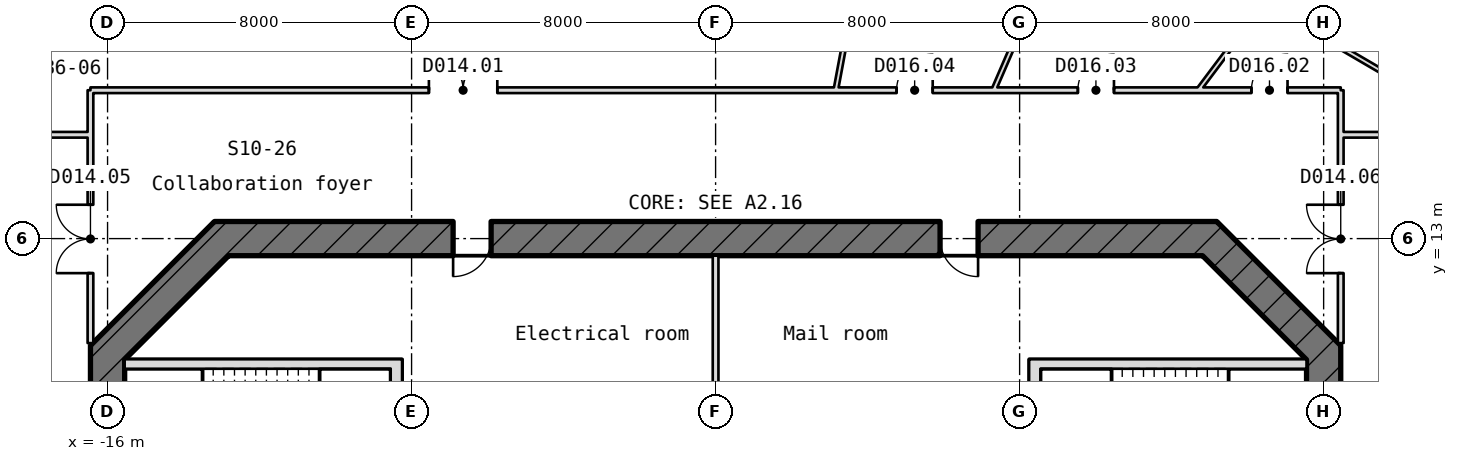
"""IFC4 building model, lengths in metres.
Left out: names, types, materials, properties, quantities, classifications, styles, units other than length and angle.
Written with IfcOpenShell. Run it as: python <this file> out.ifc"""

import sys

from ifc_helpers import new_model, si_unit, direction, frame, frame_2d, origin, place, context, subcontext, project, spatial, rectangle, extrude, element, fill, save


model = new_model("IFC4")
c1 = context("Model", 3, precision=1e-05, world=origin(), true_north=direction((0.0, 1.0)))
c2 = subcontext(c1, "Body", "Model", "MODEL_VIEW")
j1 = project(units=[si_unit("LENGTHUNIT", "METRE"), si_unit("PLANEANGLEUNIT", "RADIAN")], contexts=[c1])
p1 = place(None, origin())
s1 = spatial("IfcSite", under=j1, at=p1, CompositionType="ELEMENT")
p2 = place(p1, origin())
s2 = spatial("IfcBuilding", under=s1, at=p2, CompositionType="ELEMENT")
p3 = place(p2, frame((0.0, 0.0, 161.05)))
s3 = spatial("IfcBuildingStorey", under=s2, at=p3, CompositionType="ELEMENT", Elevation=161.05)
p4 = place(p3, frame((-16.478, 22.342, 0.0), z_axis=(0.0, 0.0, 1.0), x_axis=(-0.766197107622, -0.642605627327, 0.0)))
e1 = element("IfcWall", 1, at=p4, inside=s3, PredefinedType="SOLIDWALL", context=c2, shape_type="SweptSolid", body=[
    extrude(rectangle(XDim=11.846, YDim=0.3, at=frame_2d((5.923, 0.0))), origin(), (0.0, 0.0, 1.0), 3.97),
])
p5 = place(p4, frame((8.146, 0.0, 0.0)))
e2 = element("IfcOpeningElement", 2, at=p5, cuts=e1, PredefinedType="OPENING", context=c2, shape_type="SweptSolid", body=[
    extrude(rectangle(XDim=1.8, YDim=2.4, at=frame_2d((0.9, 1.2))), frame((0.0, 0.16, 0.0), z_axis=(0.0, -1.0, 0.0), x_axis=(1.0, 0.0, 0.0)), (0.0, 0.0, 1.0), 0.32),
])
p6 = place(p4, frame((5.546, 0.0, 0.9)))
e3 = element("IfcOpeningElement", 3, at=p6, cuts=e1, PredefinedType="OPENING", context=c2, shape_type="SweptSolid", body=[
    extrude(rectangle(XDim=2.0, YDim=1.5, at=frame_2d((1.0, 0.75))), frame((0.0, 0.16, 0.0), z_axis=(0.0, -1.0, 0.0), x_axis=(1.0, 0.0, 0.0)), (0.0, 0.0, 1.0), 0.32),
])
p7 = place(p3, frame((16.0, -10.186, -0.18), z_axis=(0.0, 0.0, 1.0), x_axis=(0.0, 1.0, 0.0)))
e4 = element("IfcWall", 4, at=p7, inside=s3, PredefinedType="SHEAR", context=c2, shape_type="SweptSolid", body=[
    extrude(rectangle(XDim=20.373, YDim=0.9, at=frame_2d((10.186, 0.0))), origin(), (0.0, 0.0, 1.0), 4.15),
])
p8 = place(p7, frame((8.986, 0.0, 0.18)))
e5 = element("IfcOpeningElement", 5, at=p8, cuts=e4, PredefinedType="OPENING", context=c2, shape_type="SweptSolid", body=[
    extrude(rectangle(XDim=2.4, YDim=2.1, at=frame_2d((1.2, 1.05))), frame((0.0, 0.46, 0.0), z_axis=(0.0, -1.0, 0.0), x_axis=(1.0, 0.0, 0.0)), (0.0, 0.0, 1.0), 0.92),
])
p9 = place(p7, frame((13.586, 0.0, 0.18)))
e6 = element("IfcOpeningElement", 6, at=p9, cuts=e4, PredefinedType="OPENING", context=c2, shape_type="SweptSolid", body=[
    extrude(rectangle(XDim=1.2, YDim=2.1, at=frame_2d((0.6, 1.05))), frame((0.0, 0.46, 0.0), z_axis=(0.0, -1.0, 0.0), x_axis=(1.0, 0.0, 0.0)), (0.0, 0.0, 1.0), 0.92),
])
p10 = place(p3, frame((16.132, 9.868, -0.18), z_axis=(0.0, 0.0, 1.0), x_axis=(-0.707106781187, 0.707106781187, 0.0)))
e7 = element("IfcWall", 7, at=p10, inside=s3, PredefinedType="SHEAR", context=c2, shape_type="SweptSolid", body=[
    extrude(rectangle(XDim=4.615, YDim=0.9, at=frame_2d((2.308, 0.0))), origin(), (0.0, 0.0, 1.0), 4.15),
])
p11 = place(p3, frame((13.186, 13.0, -0.18), z_axis=(0.0, 0.0, 1.0), x_axis=(-1.0, 0.0, 0.0)))
e8 = element("IfcWall", 8, at=p11, inside=s3, PredefinedType="SHEAR", context=c2, shape_type="SweptSolid", body=[
    extrude(rectangle(XDim=26.373, YDim=0.9, at=frame_2d((13.186, 0.0))), origin(), (0.0, 0.0, 1.0), 4.15),
])
p12 = place(p11, frame((19.094, 0.0, 0.18)))
e9 = element("IfcOpeningElement", 9, at=p12, cuts=e8, PredefinedType="OPENING", context=c2, shape_type="SweptSolid", body=[
    extrude(rectangle(XDim=1.0, YDim=2.1, at=frame_2d((0.5, 1.05))), frame((0.0, 0.46, 0.0), z_axis=(0.0, -1.0, 0.0), x_axis=(1.0, 0.0, 0.0)), (0.0, 0.0, 1.0), 0.92),
])
p13 = place(p11, frame((6.279, 0.0, 0.18)))
e10 = element("IfcOpeningElement", 10, at=p13, cuts=e8, PredefinedType="OPENING", context=c2, shape_type="SweptSolid", body=[
    extrude(rectangle(XDim=1.0, YDim=2.1, at=frame_2d((0.5, 1.05))), frame((0.0, 0.46, 0.0), z_axis=(0.0, -1.0, 0.0), x_axis=(1.0, 0.0, 0.0)), (0.0, 0.0, 1.0), 0.92),
])
p14 = place(p3, frame((-12.868, 13.132, -0.18), z_axis=(0.0, 0.0, 1.0), x_axis=(-0.707106781187, -0.707106781187, 0.0)))
e11 = element("IfcWall", 11, at=p14, inside=s3, PredefinedType="SHEAR", context=c2, shape_type="SweptSolid", body=[
    extrude(rectangle(XDim=4.615, YDim=0.9, at=frame_2d((2.308, 0.0))), origin(), (0.0, 0.0, 1.0), 4.15),
])
p15 = place(p3, frame((-16.0, 10.186, -0.18), z_axis=(0.0, 0.0, 1.0), x_axis=(0.0, -1.0, 0.0)))
e12 = element("IfcWall", 12, at=p15, inside=s3, PredefinedType="SHEAR", context=c2, shape_type="SweptSolid", body=[
    extrude(rectangle(XDim=20.373, YDim=0.9, at=frame_2d((10.186, 0.0))), origin(), (0.0, 0.0, 1.0), 4.15),
])
p16 = place(p15, frame((8.986, 0.0, 0.18)))
e13 = element("IfcOpeningElement", 13, at=p16, cuts=e12, PredefinedType="OPENING", context=c2, shape_type="SweptSolid", body=[
    extrude(rectangle(XDim=2.4, YDim=2.1, at=frame_2d((1.2, 1.05))), frame((0.0, 0.46, 0.0), z_axis=(0.0, -1.0, 0.0), x_axis=(1.0, 0.0, 0.0)), (0.0, 0.0, 1.0), 0.92),
])
p17 = place(p15, frame((5.586, 0.0, 0.18)))
e14 = element("IfcOpeningElement", 14, at=p17, cuts=e12, PredefinedType="OPENING", context=c2, shape_type="SweptSolid", body=[
    extrude(rectangle(XDim=1.2, YDim=2.1, at=frame_2d((0.6, 1.05))), frame((0.0, 0.46, 0.0), z_axis=(0.0, -1.0, 0.0), x_axis=(1.0, 0.0, 0.0)), (0.0, 0.0, 1.0), 0.92),
])
for number, where, z_axis, x_axis in (
    (15, (-15.55, 9.7, -0.18), (0.0, 0.0, 1.0), (1.0, 0.0, 0.0)),
    (16, (8.55, 9.7, -0.18), (0.0, 0.0, 1.0), (1.0, 0.0, 0.0)),
):
    element("IfcWall", number, at=place(p3, frame(where, z_axis=z_axis, x_axis=x_axis)), inside=s3, PredefinedType="SHEAR", context=c2, shape_type="SweptSolid", body=[
        extrude(rectangle(XDim=7.0, YDim=0.25, at=frame_2d((3.5, 0.0))), origin(), (0.0, 0.0, 1.0), 4.15),
    ])
p18 = place(p3, frame((-8.4, 8.35, -0.18), z_axis=(0.0, 0.0, 1.0), x_axis=(0.0, 1.0, 0.0)))
e17 = element("IfcWall", 17, at=p18, inside=s3, PredefinedType="SHEAR", context=c2, shape_type="SweptSolid", body=[
    extrude(rectangle(XDim=1.475, YDim=0.3, at=frame_2d((0.737, 0.0))), origin(), (0.0, 0.0, 1.0), 4.15),
])
p19 = place(p3, frame((0.0, 8.46, 0.0), z_axis=(0.0, 0.0, 1.0), x_axis=(0.0, 1.0, 0.0)))
e18 = element("IfcWall", 18, at=p19, inside=s3, PredefinedType="PARTITIONING", context=c2, shape_type="SweptSolid", body=[
    extrude(rectangle(XDim=4.09, YDim=0.15, at=frame_2d((2.045, 0.0))), origin(), (0.0, 0.0, 1.0), 3.97),
])
p20 = place(p3, frame((8.4, 8.35, -0.18), z_axis=(0.0, 0.0, 1.0), x_axis=(0.0, 1.0, 0.0)))
e19 = element("IfcWall", 19, at=p20, inside=s3, PredefinedType="SHEAR", context=c2, shape_type="SweptSolid", body=[
    extrude(rectangle(XDim=1.475, YDim=0.3, at=frame_2d((0.737, 0.0))), origin(), (0.0, 0.0, 1.0), 4.15),
])
p21 = place(p3, frame((-19.45, 15.732, 0.0), z_axis=(0.0, 0.0, 1.0), x_axis=(1.0, 0.0, 0.0)))
e20 = element("IfcWall", 20, at=p21, inside=s3, PredefinedType="PARTITIONING", context=c2, shape_type="SweptSolid", body=[
    extrude(rectangle(XDim=3.0, YDim=0.15, at=frame_2d((1.5, 0.0))), origin(), (0.0, 0.0, 1.0), 3.97),
])
p22 = place(p3, frame((-16.45, 10.25, 0.0), z_axis=(0.0, 0.0, 1.0), x_axis=(0.0, 1.0, 0.0)))
e21 = element("IfcWall", 21, at=p22, inside=s3, PredefinedType="PARTITIONING", context=c2, shape_type="SweptSolid", body=[
    extrude(rectangle(XDim=6.654, YDim=0.15, at=frame_2d((3.327, 0.0))), origin(), (0.0, 0.0, 1.0), 3.97),
])
p23 = place(p22, frame((1.841, 0.0, 0.0)))
e22 = element("IfcOpeningElement", 22, at=p23, cuts=e21, PredefinedType="OPENING", context=c2, shape_type="SweptSolid", body=[
    extrude(rectangle(XDim=1.8, YDim=2.1, at=frame_2d((0.9, 1.05))), frame((0.0, 0.085, 0.0), z_axis=(0.0, -1.0, 0.0), x_axis=(1.0, 0.0, 0.0)), (0.0, 0.0, 1.0), 0.17),
])
p24 = place(p3, frame((-16.45, 16.904, 0.0), z_axis=(0.0, 0.0, 1.0), x_axis=(1.0, 0.0, 0.0)))
e23 = element("IfcWall", 23, at=p24, inside=s3, PredefinedType="PARTITIONING", context=c2, shape_type="SweptSolid", body=[
    extrude(rectangle(XDim=32.9, YDim=0.15, at=frame_2d((16.45, 0.0))), origin(), (0.0, 0.0, 1.0), 3.97),
])
p25 = place(p24, frame((30.55, 0.0, 0.0)))
e24 = element("IfcOpeningElement", 24, at=p25, cuts=e23, PredefinedType="OPENING", context=c2, shape_type="SweptSolid", body=[
    extrude(rectangle(XDim=0.95, YDim=2.1, at=frame_2d((0.475, 1.05))), frame((0.0, 0.085, 0.0), z_axis=(0.0, -1.0, 0.0), x_axis=(1.0, 0.0, 0.0)), (0.0, 0.0, 1.0), 0.17),
])
p26 = place(p24, frame((25.983, 0.0, 0.0)))
e25 = element("IfcOpeningElement", 25, at=p26, cuts=e23, PredefinedType="OPENING", context=c2, shape_type="SweptSolid", body=[
    extrude(rectangle(XDim=0.95, YDim=2.1, at=frame_2d((0.475, 1.05))), frame((0.0, 0.085, 0.0), z_axis=(0.0, -1.0, 0.0), x_axis=(1.0, 0.0, 0.0)), (0.0, 0.0, 1.0), 0.17),
])
p27 = place(p24, frame((21.213, 0.0, 0.0)))
e26 = element("IfcOpeningElement", 26, at=p27, cuts=e23, PredefinedType="OPENING", context=c2, shape_type="SweptSolid", body=[
    extrude(rectangle(XDim=0.95, YDim=2.1, at=frame_2d((0.475, 1.05))), frame((0.0, 0.085, 0.0), z_axis=(0.0, -1.0, 0.0), x_axis=(1.0, 0.0, 0.0)), (0.0, 0.0, 1.0), 0.17),
])
p28 = place(p24, frame((8.906, 0.0, 0.0)))
e27 = element("IfcOpeningElement", 27, at=p28, cuts=e23, PredefinedType="OPENING", context=c2, shape_type="SweptSolid", body=[
    extrude(rectangle(XDim=1.8, YDim=2.1, at=frame_2d((0.9, 1.05))), frame((0.0, 0.085, 0.0), z_axis=(0.0, -1.0, 0.0), x_axis=(1.0, 0.0, 0.0)), (0.0, 0.0, 1.0), 0.17),
])
p29 = place(p3, frame((3.162, 16.904, 0.0), z_axis=(0.0, 0.0, 1.0), x_axis=(0.183861029676, 0.982952247958, 0.0)))
e28 = element("IfcWall", 28, at=p29, inside=s3, PredefinedType="PARTITIONING", context=c2, shape_type="SweptSolid", body=[
    extrude(rectangle(XDim=9.724, YDim=0.12, at=frame_2d((4.862, 0.0))), origin(), (0.0, 0.0, 1.0), 3.97),
])
p30 = place(p3, frame((9.547, 22.062, 0.0), z_axis=(0.0, 0.0, 1.0), x_axis=(-0.397156395758, -0.917750945142, 0.0)))
e29 = element("IfcWall", 29, at=p30, inside=s3, PredefinedType="PARTITIONING", context=c2, shape_type="SweptSolid", body=[
    extrude(rectangle(XDim=5.621, YDim=0.12, at=frame_2d((2.811, 0.0))), origin(), (0.0, 0.0, 1.0), 3.97),
])
p31 = place(p3, frame((14.433, 19.209, 0.0), z_axis=(0.0, 0.0, 1.0), x_axis=(-0.600731295076, -0.799451006076, 0.0)))
e30 = element("IfcWall", 30, at=p31, inside=s3, PredefinedType="PARTITIONING", context=c2, shape_type="SweptSolid", body=[
    extrude(rectangle(XDim=2.884, YDim=0.12, at=frame_2d((1.442, 0.0))), origin(), (0.0, 0.0, 1.0), 3.97),
])
p32 = place(p3, frame((16.45, 10.25, 0.0), z_axis=(0.0, 0.0, 1.0), x_axis=(0.0, 1.0, 0.0)))
e31 = element("IfcWall", 31, at=p32, inside=s3, PredefinedType="PARTITIONING", context=c2, shape_type="SweptSolid", body=[
    extrude(rectangle(XDim=6.654, YDim=0.15, at=frame_2d((3.327, 0.0))), origin(), (0.0, 0.0, 1.0), 3.97),
])
p33 = place(p32, frame((1.841, 0.0, 0.0)))
e32 = element("IfcOpeningElement", 32, at=p33, cuts=e31, PredefinedType="OPENING", context=c2, shape_type="SweptSolid", body=[
    extrude(rectangle(XDim=1.8, YDim=2.1, at=frame_2d((0.9, 1.05))), frame((0.0, 0.085, 0.0), z_axis=(0.0, -1.0, 0.0), x_axis=(1.0, 0.0, 0.0)), (0.0, 0.0, 1.0), 0.17),
])
p34 = place(p3, frame((16.45, 15.732, 0.0), z_axis=(0.0, 0.0, 1.0), x_axis=(1.0, 0.0, 0.0)))
e33 = element("IfcWall", 33, at=p34, inside=s3, PredefinedType="PARTITIONING", context=c2, shape_type="SweptSolid", body=[
    extrude(rectangle(XDim=3.0, YDim=0.15, at=frame_2d((1.5, 0.0))), origin(), (0.0, 0.0, 1.0), 3.97),
])
p35 = place(p3, frame((24.206, 13.502, 0.0), z_axis=(0.0, 0.0, 1.0), x_axis=(-0.863538195042, 0.504283437864, 0.0)))
e34 = element("IfcWall", 34, at=p35, inside=s3, PredefinedType="PARTITIONING", context=c2, shape_type="SweptSolid", body=[
    extrude(rectangle(XDim=22.633, YDim=0.12, at=frame_2d((11.317, 0.0))), origin(), (0.0, 0.0, 1.0), 3.97),
])
p36 = place(p12, origin())
e35 = element("IfcDoor", 35, at=p36, inside=s3, OperationType="SINGLE_SWING_RIGHT", PredefinedType="DOOR", context=c2, shape_type="SweptSolid", body=[
    extrude(rectangle(XDim=1.0, YDim=2.1, at=frame_2d((0.5, 1.05))), frame((0.0, 0.025, 0.0), z_axis=(0.0, -1.0, 0.0), x_axis=(1.0, 0.0, 0.0)), (0.0, 0.0, 1.0), 0.05),
])
fill(e9, e35)
p37 = place(p13, origin())
e36 = element("IfcDoor", 36, at=p37, inside=s3, OperationType="SINGLE_SWING_RIGHT", PredefinedType="DOOR", context=c2, shape_type="SweptSolid", body=[
    extrude(rectangle(XDim=1.0, YDim=2.1, at=frame_2d((0.5, 1.05))), frame((0.0, 0.025, 0.0), z_axis=(0.0, -1.0, 0.0), x_axis=(1.0, 0.0, 0.0)), (0.0, 0.0, 1.0), 0.05),
])
fill(e10, e36)
p38 = place(p25, origin())
e37 = element("IfcDoor", 37, at=p38, inside=s3, OperationType="SINGLE_SWING_RIGHT", PredefinedType="DOOR", context=c2, shape_type="SweptSolid", body=[
    extrude(rectangle(XDim=0.95, YDim=2.1, at=frame_2d((0.475, 1.05))), frame((0.0, 0.025, 0.0), z_axis=(0.0, -1.0, 0.0), x_axis=(1.0, 0.0, 0.0)), (0.0, 0.0, 1.0), 0.05),
])
fill(e24, e37)
p39 = place(p26, origin())
e38 = element("IfcDoor", 38, at=p39, inside=s3, OperationType="SINGLE_SWING_RIGHT", PredefinedType="DOOR", context=c2, shape_type="SweptSolid", body=[
    extrude(rectangle(XDim=0.95, YDim=2.1, at=frame_2d((0.475, 1.05))), frame((0.0, 0.025, 0.0), z_axis=(0.0, -1.0, 0.0), x_axis=(1.0, 0.0, 0.0)), (0.0, 0.0, 1.0), 0.05),
])
fill(e25, e38)
p40 = place(p27, origin())
e39 = element("IfcDoor", 39, at=p40, inside=s3, OperationType="SINGLE_SWING_RIGHT", PredefinedType="DOOR", context=c2, shape_type="SweptSolid", body=[
    extrude(rectangle(XDim=0.95, YDim=2.1, at=frame_2d((0.475, 1.05))), frame((0.0, 0.025, 0.0), z_axis=(0.0, -1.0, 0.0), x_axis=(1.0, 0.0, 0.0)), (0.0, 0.0, 1.0), 0.05),
])
fill(e26, e39)
p41 = place(p28, origin())
e40 = element("IfcDoor", 40, at=p41, inside=s3, OperationType="DOUBLE_DOOR_SINGLE_SWING", PredefinedType="DOOR", context=c2, shape_type="SweptSolid", body=[
    extrude(rectangle(XDim=1.8, YDim=2.1, at=frame_2d((0.9, 1.05))), frame((0.0, 0.025, 0.0), z_axis=(0.0, -1.0, 0.0), x_axis=(1.0, 0.0, 0.0)), (0.0, 0.0, 1.0), 0.05),
])
fill(e27, e40)
p42 = place(p23, origin())
e41 = element("IfcDoor", 41, at=p42, inside=s3, OperationType="DOUBLE_DOOR_SINGLE_SWING", PredefinedType="DOOR", context=c2, shape_type="SweptSolid", body=[
    extrude(rectangle(XDim=1.8, YDim=2.1, at=frame_2d((0.9, 1.05))), frame((0.0, 0.025, 0.0), z_axis=(0.0, -1.0, 0.0), x_axis=(1.0, 0.0, 0.0)), (0.0, 0.0, 1.0), 0.05),
])
fill(e22, e41)
p43 = place(p33, origin())
e42 = element("IfcDoor", 42, at=p43, inside=s3, OperationType="DOUBLE_DOOR_SINGLE_SWING", PredefinedType="DOOR", context=c2, shape_type="SweptSolid", body=[
    extrude(rectangle(XDim=1.8, YDim=2.1, at=frame_2d((0.9, 1.05))), frame((0.0, 0.025, 0.0), z_axis=(0.0, -1.0, 0.0), x_axis=(1.0, 0.0, 0.0)), (0.0, 0.0, 1.0), 0.05),
])
fill(e32, e42)
save(model, sys.argv[1])
